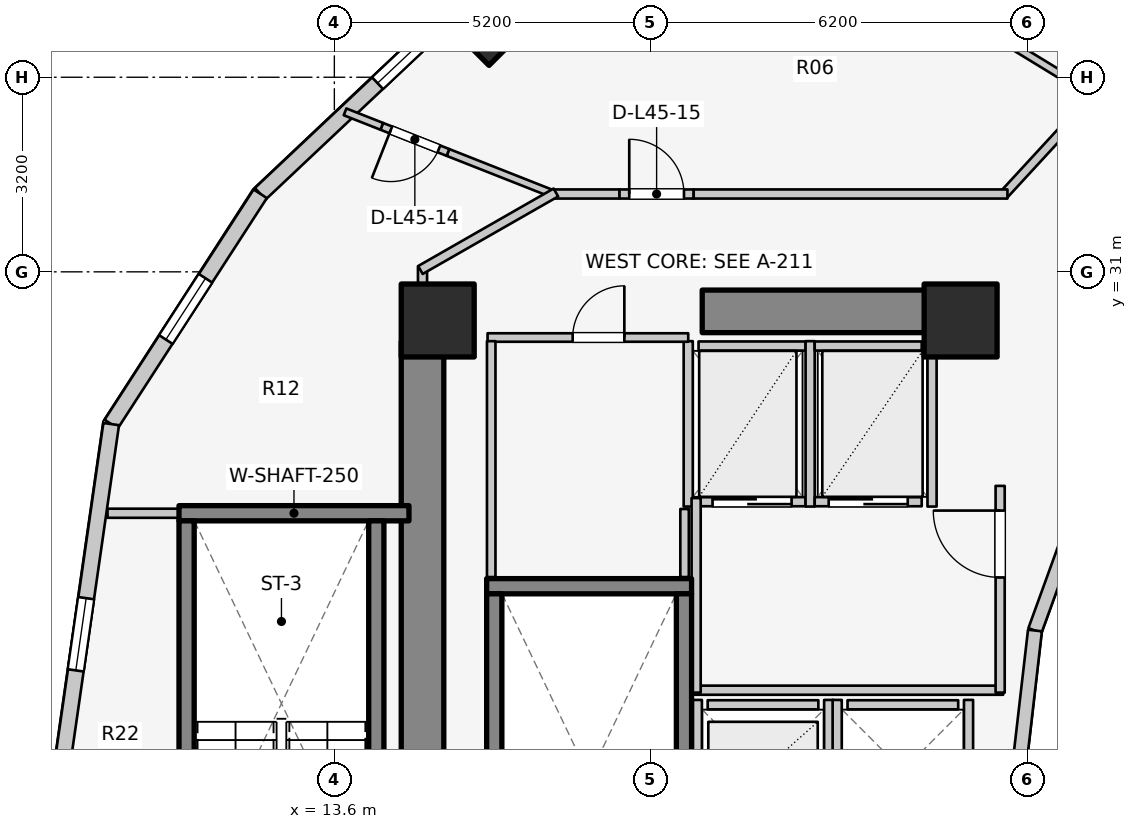
"""IFC4 building model, lengths in metres.
Left out: names, types, materials, properties, quantities, classifications, styles, units other than length and angle.
Written with IfcOpenShell. Run it as: python <this file> out.ifc"""

import sys

from ifc_helpers import new_model, si_unit, direction, frame, frame_2d, origin, origin_2d, place, context, subcontext, project, spatial, rectangle, extrude, element, fill, save


model = new_model("IFC4")
c1 = context("Model", 3, precision=1e-05, world=origin(), true_north=direction((0.0, 1.0)))
c2 = subcontext(c1, "Body", "Model", "MODEL_VIEW")
j1 = project(units=[si_unit("LENGTHUNIT", "METRE"), si_unit("PLANEANGLEUNIT", "RADIAN")], contexts=[c1])
p1 = place(None, origin())
s1 = spatial("IfcSite", under=j1, at=p1, CompositionType="ELEMENT")
p2 = place(p1, origin())
s2 = spatial("IfcBuilding", under=s1, at=p2, CompositionType="ELEMENT")
p3 = place(p2, frame((0.0, 0.0, 149.8)))
s3 = spatial("IfcBuildingStorey", under=s2, at=p3, CompositionType="ELEMENT", Elevation=149.8)
p4 = place(p3, frame((15.05, 17.05, 0.0), z_axis=(0.0, 0.0, 1.0), x_axis=(0.0, 1.0, 0.0)))
e1 = element("IfcWall", 1, at=p4, inside=s3, PredefinedType="SHEAR", context=c2, shape_type="SweptSolid", body=[
    extrude(rectangle(XDim=12.8, YDim=0.7, at=frame_2d((6.4, 0.0))), origin(), (0.0, 0.0, 1.0), 3.1),
])
p5 = place(p3, frame((19.65, 30.35, 0.0), z_axis=(0.0, 0.0, 1.0), x_axis=(1.0, 0.0, 0.0)))
e2 = element("IfcWall", 2, at=p5, inside=s3, PredefinedType="SHEAR", context=c2, shape_type="SweptSolid", body=[
    extrude(rectangle(XDim=4.5, YDim=0.7, at=frame_2d((2.25, 0.0))), origin(), (0.0, 0.0, 1.0), 3.1),
])
p6 = place(p3, frame((16.105, 25.83, 0.0), z_axis=(0.0, 0.0, 1.0), x_axis=(1.0, 0.0, 0.0)))
e3 = element("IfcWall", 3, at=p6, inside=s3, PredefinedType="SOLIDWALL", context=c2, shape_type="SweptSolid", body=[
    extrude(rectangle(XDim=3.37, YDim=0.25, at=frame_2d((1.685, 0.0))), origin(), (0.0, 0.0, 1.0), 3.1),
])
for number, where, z_axis, x_axis in (
    (4, (16.23, 17.895, 0.0), (0.0, 0.0, 1.0), (0.0, 1.0, 0.0)),
    (5, (19.35, 17.895, 0.0), (0.0, 0.0, 1.0), (0.0, 1.0, 0.0)),
):
    element("IfcWall", number, at=place(p3, frame(where, z_axis=z_axis, x_axis=x_axis)), inside=s3, PredefinedType="SOLIDWALL", context=c2, shape_type="SweptSolid", body=[
        extrude(rectangle(XDim=7.81, YDim=0.25, at=frame_2d((3.905, 0.0))), origin(), (0.0, 0.0, 1.0), 3.1),
    ])
p7 = place(p3, frame((11.045, 27.03, 0.0), z_axis=(0.0, 0.0, 1.0), x_axis=(1.0, 0.0, 0.0)))
e6 = element("IfcWall", 6, at=p7, inside=s3, PredefinedType="SOLIDWALL", context=c2, shape_type="SweptSolid", body=[
    extrude(rectangle(XDim=3.782, YDim=0.25, at=frame_2d((1.891, 0.0))), origin(), (0.0, 0.0, 1.0), 3.1),
])
for number, where, z_axis, x_axis in (
    (7, (11.17, 19.095, 0.0), (0.0, 0.0, 1.0), (0.0, 1.0, 0.0)),
    (8, (14.29, 19.095, 0.0), (0.0, 0.0, 1.0), (0.0, 1.0, 0.0)),
):
    element("IfcWall", number, at=place(p3, frame(where, z_axis=z_axis, x_axis=x_axis)), inside=s3, PredefinedType="SOLIDWALL", context=c2, shape_type="SweptSolid", body=[
        extrude(rectangle(XDim=7.81, YDim=0.25, at=frame_2d((3.905, 0.0))), origin(), (0.0, 0.0, 1.0), 3.1),
    ])
for number, where, z_axis, x_axis in (
    (9, (23.9, 30.2, 0.0), (0.0, 0.0, 1.0), (1.0, 0.0, 0.0)),
    (10, (15.3, 30.2, 0.0), (0.0, 0.0, 1.0), (1.0, 0.0, 0.0)),
):
    element("IfcColumn", number, at=place(p3, frame(where, z_axis=z_axis, x_axis=x_axis)), inside=s3, PredefinedType="COLUMN", context=c2, shape_type="SweptSolid", body=[
        extrude(rectangle(XDim=1.2, YDim=1.2, at=origin_2d()), origin(), (0.0, 0.0, 1.0), 3.1),
    ])
p8 = place(p3, frame((16.143, 35.031, 0.0), z_axis=(0.0, 0.0, 1.0), x_axis=(-0.707106781187, 0.707106781187, 0.0)))
e11 = element("IfcColumn", 11, at=p8, inside=s3, PredefinedType="COLUMN", context=c2, shape_type="SweptSolid", body=[
    extrude(rectangle(XDim=0.9, YDim=0.9, at=origin_2d()), origin(), (0.0, 0.0, 1.0), 3.1),
])
p9 = place(p3, frame((25.834, 27.06, 0.0), z_axis=(0.0, 0.0, 1.0), x_axis=(-0.341423187295, -0.93990968033, 0.0)))
e12 = element("IfcWall", 12, at=p9, inside=s3, PredefinedType="STANDARD", context=c2, shape_type="SweptSolid", body=[
    extrude(rectangle(XDim=2.084, YDim=0.23, at=frame_2d((1.042, 0.0))), origin(), (0.0, 0.0, 1.0), 2.56),
])
p10 = place(p3, frame((25.123, 25.102, 0.0), z_axis=(0.0, 0.0, 1.0), x_axis=(-0.114711713601, -0.993398823617, 0.0)))
e13 = element("IfcWall", 13, at=p10, inside=s3, PredefinedType="STANDARD", context=c2, shape_type="SweptSolid", body=[
    extrude(rectangle(XDim=2.115, YDim=0.23, at=frame_2d((1.058, 0.0))), origin(), (0.0, 0.0, 1.0), 2.56),
])
p11 = place(p3, frame((15.731, 35.441, 0.0), z_axis=(0.0, 0.0, 1.0), x_axis=(-0.727667301037, -0.68593024354, 0.0)))
e14 = element("IfcWall", 14, at=p11, inside=s3, PredefinedType="STANDARD", context=c2, shape_type="SweptSolid", body=[
    extrude(rectangle(XDim=4.604, YDim=0.26, at=frame_2d((2.302, 0.0))), origin(), (0.0, 0.0, 1.0), 1.22),
])
p12 = place(p11, frame((0.751, 0.0, 0.15)))
e15 = element("IfcOpeningElement", 15, at=p12, cuts=e14, PredefinedType="OPENING", context=c2, shape_type="SweptSolid", body=[
    extrude(rectangle(XDim=1.2, YDim=0.9, at=frame_2d((0.6, 0.45))), frame((0.0, 0.14, 0.0), z_axis=(0.0, -1.0, 0.0), x_axis=(1.0, 0.0, 0.0)), (0.0, 0.0, 1.0), 0.28),
])
p13 = place(p3, frame((12.381, 32.284, 0.0), z_axis=(0.0, 0.0, 1.0), x_axis=(-0.543358984534, -0.839500454989, 0.0)))
e16 = element("IfcWall", 16, at=p13, inside=s3, PredefinedType="STANDARD", context=c2, shape_type="SweptSolid", body=[
    extrude(rectangle(XDim=4.511, YDim=0.26, at=frame_2d((2.256, 0.0))), origin(), (0.0, 0.0, 1.0), 1.22),
])
p14 = place(p13, frame((1.656, 0.0, 0.15)))
e17 = element("IfcOpeningElement", 17, at=p14, cuts=e16, PredefinedType="OPENING", context=c2, shape_type="SweptSolid", body=[
    extrude(rectangle(XDim=1.2, YDim=0.9, at=frame_2d((0.6, 0.45))), frame((0.0, 0.14, 0.0), z_axis=(0.0, -1.0, 0.0), x_axis=(1.0, 0.0, 0.0)), (0.0, 0.0, 1.0), 0.28),
])
p15 = place(p3, frame((9.93, 28.497, 0.0), z_axis=(0.0, 0.0, 1.0), x_axis=(-0.142227632286, -0.989833976288, 0.0)))
e18 = element("IfcWall", 18, at=p15, inside=s3, PredefinedType="STANDARD", context=c2, shape_type="SweptSolid", body=[
    extrude(rectangle(XDim=5.553, YDim=0.26, at=frame_2d((2.776, 0.0))), origin(), (0.0, 0.0, 1.0), 2.57),
])
p16 = place(p15, frame((2.892, 0.0, 0.75)))
e19 = element("IfcOpeningElement", 19, at=p16, cuts=e18, PredefinedType="OPENING", context=c2, shape_type="SweptSolid", body=[
    extrude(rectangle(XDim=1.2, YDim=1.5, at=frame_2d((0.6, 0.75))), frame((0.0, 0.14, 0.0), z_axis=(0.0, -1.0, 0.0), x_axis=(1.0, 0.0, 0.0)), (0.0, 0.0, 1.0), 0.28),
])
p17 = place(p3, frame((19.74, 23.88, 0.0), z_axis=(0.0, 0.0, 1.0), x_axis=(1.0, 0.0, 0.0)))
e20 = element("IfcWall", 20, at=p17, inside=s3, PredefinedType="SOLIDWALL", context=c2, shape_type="SweptSolid", body=[
    extrude(rectangle(XDim=1.82, YDim=0.15, at=frame_2d((0.91, 0.0))), origin(), (0.0, 0.0, 1.0), 2.575),
])
for number, where, z_axis, x_axis in (
    (21, (19.57, 21.64, 0.0), (0.0, 0.0, 1.0), (0.0, 1.0, 0.0)),
    (22, (21.73, 21.64, 0.0), (0.0, 0.0, 1.0), (0.0, 1.0, 0.0)),
):
    element("IfcWall", number, at=place(p3, frame(where, z_axis=z_axis, x_axis=x_axis)), inside=s3, PredefinedType="SOLIDWALL", context=c2, shape_type="SweptSolid", body=[
        extrude(rectangle(XDim=2.32, YDim=0.15, at=frame_2d((1.16, 0.0))), origin(), (0.0, 0.0, 1.0), 2.575),
    ])
p18 = place(p3, frame((22.04, 23.88, 0.0), z_axis=(0.0, 0.0, 1.0), x_axis=(1.0, 0.0, 0.0)))
e23 = element("IfcWall", 23, at=p18, inside=s3, PredefinedType="SOLIDWALL", context=c2, shape_type="SweptSolid", body=[
    extrude(rectangle(XDim=1.82, YDim=0.15, at=frame_2d((0.91, 0.0))), origin(), (0.0, 0.0, 1.0), 2.12),
])
p19 = place(p3, frame((21.87, 21.64, 0.0), z_axis=(0.0, 0.0, 1.0), x_axis=(0.0, 1.0, 0.0)))
e24 = element("IfcWall", 24, at=p19, inside=s3, PredefinedType="SOLIDWALL", context=c2, shape_type="SweptSolid", body=[
    extrude(rectangle(XDim=2.32, YDim=0.15, at=frame_2d((1.16, 0.0))), origin(), (0.0, 0.0, 1.0), 2.575),
])
p20 = place(p3, frame((24.03, 21.64, 0.0), z_axis=(0.0, 0.0, 1.0), x_axis=(0.0, 1.0, 0.0)))
e25 = element("IfcWall", 25, at=p20, inside=s3, PredefinedType="SOLIDWALL", context=c2, shape_type="SweptSolid", body=[
    extrude(rectangle(XDim=2.32, YDim=0.15, at=frame_2d((1.16, 0.0))), origin(), (0.0, 0.0, 1.0), 2.12),
])
p21 = place(p3, frame((19.59, 27.22, 0.0), z_axis=(0.0, 0.0, 1.0), x_axis=(1.0, 0.0, 0.0)))
e26 = element("IfcWall", 26, at=p21, inside=s3, PredefinedType="SOLIDWALL", context=c2, shape_type="SweptSolid", body=[
    extrude(rectangle(XDim=1.76, YDim=0.15, at=frame_2d((0.88, 0.0))), origin(), (0.0, 0.0, 1.0), 2.575),
])
p22 = place(p21, frame((0.23, 0.0, 0.0)))
e27 = element("IfcOpeningElement", 27, at=p22, cuts=e26, PredefinedType="OPENING", context=c2, shape_type="SweptSolid", body=[
    extrude(rectangle(XDim=1.3, YDim=2.1, at=frame_2d((0.65, 1.05))), frame((0.0, 0.085, 0.0), z_axis=(0.0, -1.0, 0.0), x_axis=(1.0, 0.0, 0.0)), (0.0, 0.0, 1.0), 0.17),
])
p23 = place(p3, frame((19.59, 29.78, 0.0), z_axis=(0.0, 0.0, 1.0), x_axis=(1.0, 0.0, 0.0)))
e28 = element("IfcWall", 28, at=p23, inside=s3, PredefinedType="SOLIDWALL", context=c2, shape_type="SweptSolid", body=[
    extrude(rectangle(XDim=1.76, YDim=0.15, at=frame_2d((0.88, 0.0))), origin(), (0.0, 0.0, 1.0), 2.575),
])
for number, where, z_axis, x_axis in (
    (29, (19.42, 27.14, 0.0), (0.0, 0.0, 1.0), (0.0, 1.0, 0.0)),
    (30, (21.425, 27.14, 0.0), (0.0, 0.0, 1.0), (0.0, 1.0, 0.0)),
):
    element("IfcWall", number, at=place(p3, frame(where, z_axis=z_axis, x_axis=x_axis)), inside=s3, PredefinedType="SOLIDWALL", context=c2, shape_type="SweptSolid", body=[
        extrude(rectangle(XDim=2.72, YDim=0.15, at=frame_2d((1.36, 0.0))), origin(), (0.0, 0.0, 1.0), 2.575),
    ])
p24 = place(p3, frame((21.5, 27.22, 0.0), z_axis=(0.0, 0.0, 1.0), x_axis=(1.0, 0.0, 0.0)))
e31 = element("IfcWall", 31, at=p24, inside=s3, PredefinedType="SOLIDWALL", context=c2, shape_type="SweptSolid", body=[
    extrude(rectangle(XDim=1.76, YDim=0.15, at=frame_2d((0.88, 0.0))), origin(), (0.0, 0.0, 1.0), 2.575),
])
p25 = place(p24, frame((0.23, 0.0, 0.0)))
e32 = element("IfcOpeningElement", 32, at=p25, cuts=e31, PredefinedType="OPENING", context=c2, shape_type="SweptSolid", body=[
    extrude(rectangle(XDim=1.3, YDim=2.1, at=frame_2d((0.65, 1.05))), frame((0.0, 0.085, 0.0), z_axis=(0.0, -1.0, 0.0), x_axis=(1.0, 0.0, 0.0)), (0.0, 0.0, 1.0), 0.17),
])
p26 = place(p3, frame((21.5, 29.78, 0.0), z_axis=(0.0, 0.0, 1.0), x_axis=(1.0, 0.0, 0.0)))
e33 = element("IfcWall", 33, at=p26, inside=s3, PredefinedType="SOLIDWALL", context=c2, shape_type="SweptSolid", body=[
    extrude(rectangle(XDim=1.76, YDim=0.15, at=frame_2d((0.88, 0.0))), origin(), (0.0, 0.0, 1.0), 2.575),
])
p27 = place(p3, frame((23.43, 27.14, 0.0), z_axis=(0.0, 0.0, 1.0), x_axis=(0.0, 1.0, 0.0)))
e34 = element("IfcWall", 34, at=p27, inside=s3, PredefinedType="SOLIDWALL", context=c2, shape_type="SweptSolid", body=[
    extrude(rectangle(XDim=2.72, YDim=0.15, at=frame_2d((1.36, 0.0))), origin(), (0.0, 0.0, 1.0), 2.575),
])
p28 = place(p3, frame((19.52, 24.12, 0.0), z_axis=(0.0, 0.0, 1.0), x_axis=(1.0, 0.0, 0.0)))
e35 = element("IfcWall", 35, at=p28, inside=s3, PredefinedType="PARTITIONING", context=c2, shape_type="SweptSolid", body=[
    extrude(rectangle(XDim=5.08, YDim=0.15, at=frame_2d((2.54, 0.0))), origin(), (0.0, 0.0, 1.0), 2.12),
])
p29 = place(p3, frame((19.55, 24.08, 0.0), z_axis=(0.0, 0.0, 1.0), x_axis=(0.0, 1.0, 0.0)))
e36 = element("IfcWall", 36, at=p29, inside=s3, PredefinedType="PARTITIONING", context=c2, shape_type="SweptSolid", body=[
    extrude(rectangle(XDim=3.2, YDim=0.15, at=frame_2d((1.6, 0.0))), origin(), (0.0, 0.0, 1.0), 2.575),
])
p30 = place(p3, frame((24.55, 24.08, 0.0), z_axis=(0.0, 0.0, 1.0), x_axis=(0.0, 1.0, 0.0)))
e37 = element("IfcWall", 37, at=p30, inside=s3, PredefinedType="PARTITIONING", context=c2, shape_type="SweptSolid", body=[
    extrude(rectangle(XDim=3.4, YDim=0.15, at=frame_2d((1.7, 0.0))), origin(), (0.0, 0.0, 1.0), 2.575),
])
p31 = place(p30, frame((1.894, 0.0, 0.0)))
e38 = element("IfcOpeningElement", 38, at=p31, cuts=e37, PredefinedType="OPENING", context=c2, shape_type="SweptSolid", body=[
    extrude(rectangle(XDim=1.1, YDim=2.1, at=frame_2d((0.55, 1.05))), frame((0.0, 0.085, 0.0), z_axis=(0.0, -1.0, 0.0), x_axis=(1.0, 0.0, 0.0)), (0.0, 0.0, 1.0), 0.17),
])
p32 = place(p3, frame((16.12, 29.92, 0.0), z_axis=(0.0, 0.0, 1.0), x_axis=(1.0, 0.0, 0.0)))
e39 = element("IfcWall", 39, at=p32, inside=s3, PredefinedType="PLUMBINGWALL", context=c2, shape_type="SweptSolid", body=[
    extrude(rectangle(XDim=3.3, YDim=0.14, at=frame_2d((1.65, 0.0))), origin(), (0.0, 0.0, 1.0), 2.575),
])
p33 = place(p32, frame((1.399, 0.0, 0.0)))
e40 = element("IfcOpeningElement", 40, at=p33, cuts=e39, PredefinedType="OPENING", context=c2, shape_type="SweptSolid", body=[
    extrude(rectangle(XDim=0.85, YDim=2.05, at=frame_2d((0.425, 1.025))), frame((0.0, 0.08, 0.0), z_axis=(0.0, -1.0, 0.0), x_axis=(1.0, 0.0, 0.0)), (0.0, 0.0, 1.0), 0.16),
])
p34 = place(p3, frame((16.18, 25.98, 0.0), z_axis=(0.0, 0.0, 1.0), x_axis=(0.0, 1.0, 0.0)))
e41 = element("IfcWall", 41, at=p34, inside=s3, PredefinedType="PLUMBINGWALL", context=c2, shape_type="SweptSolid", body=[
    extrude(rectangle(XDim=3.88, YDim=0.14, at=frame_2d((1.94, 0.0))), origin(), (0.0, 0.0, 1.0), 2.575),
])
p35 = place(p3, frame((19.36, 25.98, 0.0), z_axis=(0.0, 0.0, 1.0), x_axis=(0.0, 1.0, 0.0)))
e42 = element("IfcWall", 42, at=p35, inside=s3, PredefinedType="PLUMBINGWALL", context=c2, shape_type="SweptSolid", body=[
    extrude(rectangle(XDim=1.12, YDim=0.14, at=frame_2d((0.56, 0.0))), origin(), (0.0, 0.0, 1.0), 2.575),
])
p36 = place(p3, frame((9.87, 27.03, 0.0), z_axis=(0.0, 0.0, 1.0), x_axis=(1.0, 0.0, 0.0)))
e43 = element("IfcWall", 43, at=p36, inside=s3, PredefinedType="PARTITIONING", context=c2, shape_type="SweptSolid", body=[
    extrude(rectangle(XDim=1.17, YDim=0.15, at=frame_2d((0.585, 0.0))), origin(), (0.0, 0.0, 1.0), 2.575),
])
p37 = place(p3, frame((15.05, 29.8, 0.0), z_axis=(0.0, 0.0, 1.0), x_axis=(0.0, 1.0, 0.0)))
e44 = element("IfcWall", 44, at=p37, inside=s3, PredefinedType="PARTITIONING", context=c2, shape_type="SweptSolid", body=[
    extrude(rectangle(XDim=1.29, YDim=0.15, at=frame_2d((0.645, 0.0))), origin(), (0.0, 0.0, 1.0), 1.22),
])
p38 = place(p3, frame((17.247, 32.262, 0.0), z_axis=(0.0, 0.0, 1.0), x_axis=(-0.930227502765, 0.36698336897, 0.0)))
e45 = element("IfcWall", 45, at=p38, inside=s3, PredefinedType="MOVABLE", context=c2, shape_type="SweptSolid", body=[
    extrude(rectangle(XDim=1.912, YDim=0.12, at=frame_2d((0.956, 0.0))), origin(), (0.0, 0.0, 1.0), 1.22),
])
p39 = place(p3, frame((15.468, 32.963, 0.0), z_axis=(0.0, 0.0, 1.0), x_axis=(-0.93017960314, 0.367104761482, 0.0)))
e46 = element("IfcWall", 46, at=p39, inside=s3, PredefinedType="MOVABLE", context=c2, shape_type="SweptSolid", body=[
    extrude(rectangle(XDim=1.17, YDim=0.12, at=frame_2d((0.585, 0.0))), origin(), (0.0, 0.0, 1.0), 2.11),
])
p40 = place(p39, frame((0.16, 0.0, 0.0)))
e47 = element("IfcOpeningElement", 47, at=p40, cuts=e46, PredefinedType="OPENING", context=c2, shape_type="SweptSolid", body=[
    extrude(rectangle(XDim=0.85, YDim=2.05, at=frame_2d((0.425, 1.025))), frame((0.0, 0.07, 0.0), z_axis=(0.0, -1.0, 0.0), x_axis=(1.0, 0.0, 0.0)), (0.0, 0.0, 1.0), 0.14),
])
p41 = place(p3, frame((14.38, 33.393, 0.0), z_axis=(0.0, 0.0, 1.0), x_axis=(-0.9301788827, 0.367106586945, 0.0)))
e48 = element("IfcWall", 48, at=p41, inside=s3, PredefinedType="MOVABLE", context=c2, shape_type="SweptSolid", body=[
    extrude(rectangle(XDim=0.649, YDim=0.12, at=frame_2d((0.325, 0.0))), origin(), (0.0, 0.0, 1.0), 2.575),
])
p42 = place(p3, frame((26.072, 33.856, 0.0), z_axis=(0.0, 0.0, 1.0), x_axis=(-0.677579737957, -0.735449317567, 0.0)))
e49 = element("IfcWall", 49, at=p42, inside=s3, PredefinedType="PARTITIONING", context=c2, shape_type="SweptSolid", body=[
    extrude(rectangle(XDim=2.173, YDim=0.15, at=frame_2d((1.086, 0.0))), origin(), (0.0, 0.0, 1.0), 2.019),
])
p43 = place(p3, frame((17.15, 32.28, 0.0), z_axis=(0.0, 0.0, 1.0), x_axis=(1.0, 0.0, 0.0)))
e50 = element("IfcWall", 50, at=p43, inside=s3, PredefinedType="PARTITIONING", context=c2, shape_type="SweptSolid", body=[
    extrude(rectangle(XDim=1.14, YDim=0.15, at=frame_2d((0.57, 0.0))), origin(), (0.0, 0.0, 1.0), 2.575),
])
p44 = place(p3, frame((18.29, 32.28, 0.0), z_axis=(0.0, 0.0, 1.0), x_axis=(1.0, 0.0, 0.0)))
e51 = element("IfcWall", 51, at=p44, inside=s3, PredefinedType="PARTITIONING", context=c2, shape_type="SweptSolid", body=[
    extrude(rectangle(XDim=1.22, YDim=0.15, at=frame_2d((0.61, 0.0))), origin(), (0.0, 0.0, 1.0), 2.575),
])
p45 = place(p44, frame((0.16, 0.0, 0.0)))
e52 = element("IfcOpeningElement", 52, at=p45, cuts=e51, PredefinedType="OPENING", context=c2, shape_type="SweptSolid", body=[
    extrude(rectangle(XDim=0.9, YDim=2.1, at=frame_2d((0.45, 1.05))), frame((0.0, 0.085, 0.0), z_axis=(0.0, -1.0, 0.0), x_axis=(1.0, 0.0, 0.0)), (0.0, 0.0, 1.0), 0.17),
])
p46 = place(p3, frame((19.51, 32.28, 0.0), z_axis=(0.0, 0.0, 1.0), x_axis=(1.0, 0.0, 0.0)))
e53 = element("IfcWall", 53, at=p46, inside=s3, PredefinedType="PARTITIONING", context=c2, shape_type="SweptSolid", body=[
    extrude(rectangle(XDim=5.16, YDim=0.15, at=frame_2d((2.58, 0.0))), origin(), (0.0, 0.0, 1.0), 2.019),
])
p47 = place(p3, frame((17.243, 32.305, 0.0), z_axis=(0.0, 0.0, 1.0), x_axis=(-0.867991349648, -0.496579315857, 0.0)))
e54 = element("IfcWall", 54, at=p47, inside=s3, PredefinedType="PARTITIONING", context=c2, shape_type="SweptSolid", body=[
    extrude(rectangle(XDim=2.567, YDim=0.15, at=frame_2d((1.283, 0.0))), origin(), (0.0, 0.0, 1.0), 1.22),
])
p48 = place(p3, frame((26.062, 33.925, 0.0), z_axis=(0.0, 0.0, 1.0), x_axis=(-0.853440334679, 0.521190555501, 0.0)))
e55 = element("IfcWall", 55, at=p48, inside=s3, PredefinedType="PARTITIONING", context=c2, shape_type="SweptSolid", body=[
    extrude(rectangle(XDim=6.966, YDim=0.125, at=frame_2d((3.483, 0.0))), origin(), (0.0, 0.0, 1.0), 1.22),
])
p49 = place(p12, origin())
e56 = element("IfcWindow", 56, at=p49, inside=s3, PartitioningType="SINGLE_PANEL", PredefinedType="WINDOW", context=c2, shape_type="SweptSolid", body=[
    extrude(rectangle(XDim=1.2, YDim=0.9, at=frame_2d((0.6, 0.45))), frame((0.0, 0.03, 0.0), z_axis=(0.0, -1.0, 0.0), x_axis=(1.0, 0.0, 0.0)), (0.0, 0.0, 1.0), 0.06),
])
fill(e15, e56)
p50 = place(p14, origin())
e57 = element("IfcWindow", 57, at=p50, inside=s3, PartitioningType="SINGLE_PANEL", PredefinedType="WINDOW", context=c2, shape_type="SweptSolid", body=[
    extrude(rectangle(XDim=1.2, YDim=0.9, at=frame_2d((0.6, 0.45))), frame((0.0, 0.03, 0.0), z_axis=(0.0, -1.0, 0.0), x_axis=(1.0, 0.0, 0.0)), (0.0, 0.0, 1.0), 0.06),
])
fill(e17, e57)
p51 = place(p16, origin())
e58 = element("IfcWindow", 58, at=p51, inside=s3, PartitioningType="SINGLE_PANEL", PredefinedType="WINDOW", context=c2, shape_type="SweptSolid", body=[
    extrude(rectangle(XDim=1.2, YDim=1.5, at=frame_2d((0.6, 0.75))), frame((0.0, 0.03, 0.0), z_axis=(0.0, -1.0, 0.0), x_axis=(1.0, 0.0, 0.0)), (0.0, 0.0, 1.0), 0.06),
])
fill(e19, e58)
p52 = place(p22, origin())
e59 = element("IfcDoor", 59, at=p52, inside=s3, OperationType="DOUBLE_DOOR_SLIDING", PredefinedType="DOOR", context=c2, shape_type="SweptSolid", body=[
    extrude(rectangle(XDim=1.3, YDim=2.1, at=frame_2d((0.65, 1.05))), frame((0.0, 0.025, 0.0), z_axis=(0.0, -1.0, 0.0), x_axis=(1.0, 0.0, 0.0)), (0.0, 0.0, 1.0), 0.05),
])
fill(e27, e59)
p53 = place(p25, origin())
e60 = element("IfcDoor", 60, at=p53, inside=s3, OperationType="DOUBLE_DOOR_SLIDING", PredefinedType="DOOR", context=c2, shape_type="SweptSolid", body=[
    extrude(rectangle(XDim=1.3, YDim=2.1, at=frame_2d((0.65, 1.05))), frame((0.0, 0.025, 0.0), z_axis=(0.0, -1.0, 0.0), x_axis=(1.0, 0.0, 0.0)), (0.0, 0.0, 1.0), 0.05),
])
fill(e32, e60)
p54 = place(p31, origin())
e61 = element("IfcDoor", 61, at=p54, inside=s3, OperationType="SINGLE_SWING_RIGHT", PredefinedType="DOOR", context=c2, shape_type="SweptSolid", body=[
    extrude(rectangle(XDim=1.1, YDim=2.1, at=frame_2d((0.55, 1.05))), frame((0.0, 0.025, 0.0), z_axis=(0.0, -1.0, 0.0), x_axis=(1.0, 0.0, 0.0)), (0.0, 0.0, 1.0), 0.05),
])
fill(e38, e61)
p55 = place(p33, origin())
e62 = element("IfcDoor", 62, at=p55, inside=s3, OperationType="SINGLE_SWING_RIGHT", PredefinedType="DOOR", context=c2, shape_type="SweptSolid", body=[
    extrude(rectangle(XDim=0.85, YDim=2.05, at=frame_2d((0.425, 1.025))), frame((0.0, 0.025, 0.0), z_axis=(0.0, -1.0, 0.0), x_axis=(1.0, 0.0, 0.0)), (0.0, 0.0, 1.0), 0.05),
])
fill(e40, e62)
p56 = place(p40, origin())
e63 = element("IfcDoor", 63, at=p56, inside=s3, OperationType="SINGLE_SWING_RIGHT", PredefinedType="DOOR", context=c2, shape_type="SweptSolid", body=[
    extrude(rectangle(XDim=0.85, YDim=2.05, at=frame_2d((0.425, 1.025))), frame((0.0, 0.025, 0.0), z_axis=(0.0, -1.0, 0.0), x_axis=(1.0, 0.0, 0.0)), (0.0, 0.0, 1.0), 0.05),
])
fill(e47, e63)
p57 = place(p45, origin())
e64 = element("IfcDoor", 64, at=p57, inside=s3, OperationType="SINGLE_SWING_LEFT", PredefinedType="DOOR", context=c2, shape_type="SweptSolid", body=[
    extrude(rectangle(XDim=0.9, YDim=2.1, at=frame_2d((0.45, 1.05))), frame((0.0, 0.025, 0.0), z_axis=(0.0, -1.0, 0.0), x_axis=(1.0, 0.0, 0.0)), (0.0, 0.0, 1.0), 0.05),
])
fill(e52, e64)
save(model, sys.argv[1])
